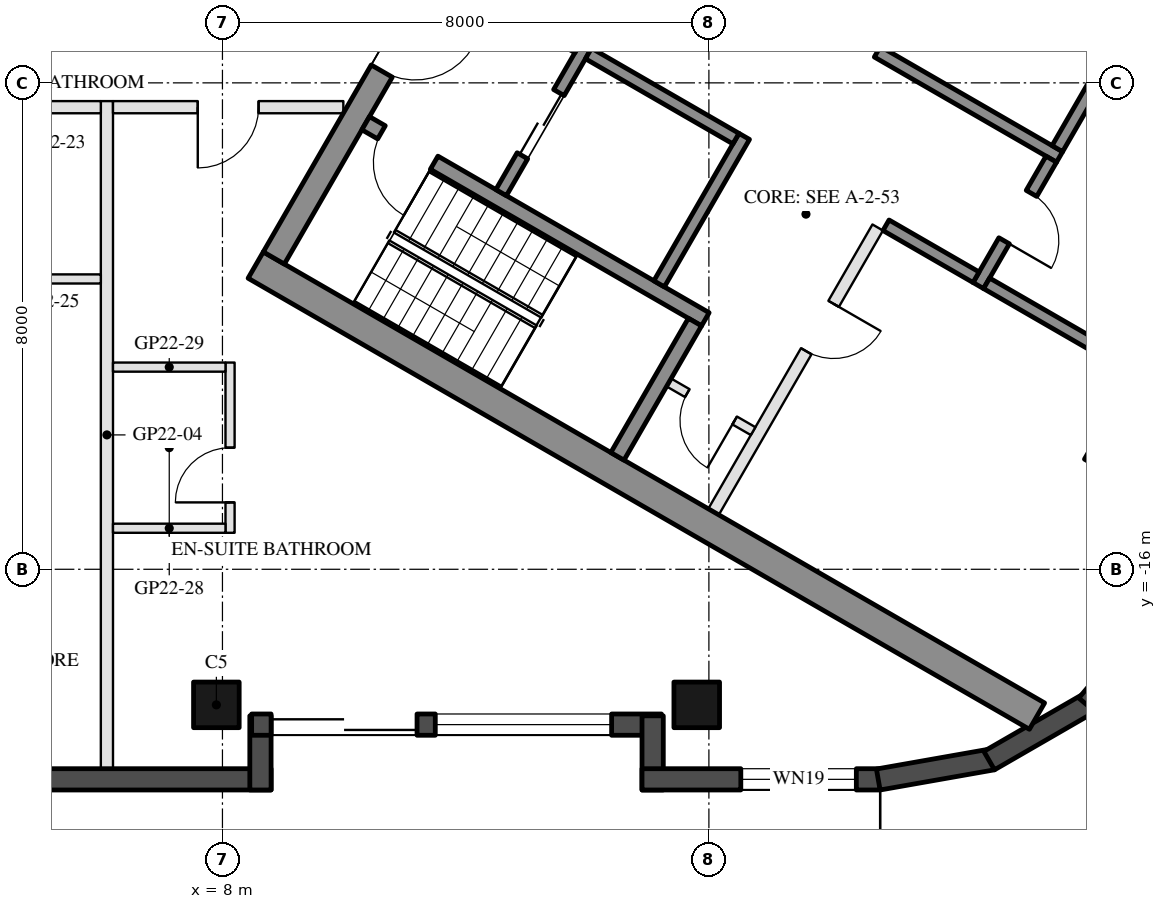
"""IFC4 building model, lengths in metres.
Left out: names, types, materials, properties, quantities, classifications, styles, units other than length and angle.
Written with IfcOpenShell. Run it as: python <this file> out.ifc"""

import sys

from ifc_helpers import new_model, si_unit, direction, frame, frame_2d, origin, origin_2d, place, context, subcontext, project, spatial, rectangle, hollow_rectangle, extrude, element, fill, save


model = new_model("IFC4")
c1 = context("Model", 3, precision=1e-05, world=origin(), true_north=direction((0.0, 1.0)))
c2 = subcontext(c1, "Body", "Model", "MODEL_VIEW")
j1 = project(units=[si_unit("LENGTHUNIT", "METRE"), si_unit("PLANEANGLEUNIT", "RADIAN")], contexts=[c1])
p1 = place(None, origin())
s1 = spatial("IfcSite", under=j1, at=p1, CompositionType="ELEMENT")
p2 = place(p1, origin())
s2 = spatial("IfcBuilding", under=s1, at=p2, CompositionType="ELEMENT")
p3 = place(p2, frame((0.0, 0.0, 228.0)))
s3 = spatial("IfcBuildingStorey", under=s2, at=p3, CompositionType="ELEMENT", Elevation=228.0)
for number, where, z_axis, x_axis in (
    (1, (7.9, -18.23, 0.0), (0.0, 0.0, 1.0), (-1.0, 0.0, 0.0)),
    (2, (15.8, -18.23, 0.0), (0.0, 0.0, 1.0), (-1.0, 0.0, 0.0)),
):
    element("IfcColumn", number, at=place(p3, frame(where, z_axis=z_axis, x_axis=x_axis)), inside=s3, PredefinedType="COLUMN", context=c2, shape_type="SweptSolid", body=[
        extrude(hollow_rectangle(XDim=0.75, YDim=0.75, WallThickness=0.035, at=origin_2d()), origin(), (0.0, 0.0, 1.0), 3.7),
    ])
p4 = place(p3, frame((23.729, -13.7, 0.0), z_axis=(0.0, 0.0, 1.0), x_axis=(0.5, 0.866025403784, 0.0)))
e3 = element("IfcColumn", 3, at=p4, inside=s3, PredefinedType="COLUMN", context=c2, shape_type="SweptSolid", body=[
    extrude(hollow_rectangle(XDim=2.4, YDim=2.2, WallThickness=0.06, at=origin_2d()), origin(), (0.0, 0.0, 1.0), 3.7),
])
p5 = place(p3, frame((-0.9, -19.455, 0.0), z_axis=(0.0, 0.0, 1.0), x_axis=(1.0, 0.0, 0.0)))
e4 = element("IfcWall", 4, at=p5, inside=s3, PredefinedType="SOLIDWALL", context=c2, shape_type="SweptSolid", body=[
    extrude(rectangle(XDim=9.7, YDim=0.35, at=frame_2d((4.85, 0.0))), origin(), (0.0, 0.0, 1.0), 3.45),
])
p6 = place(p5, frame((4.5, 0.0, 0.0)))
e5 = element("IfcOpeningElement", 5, at=p6, cuts=e4, PredefinedType="OPENING", context=c2, shape_type="SweptSolid", body=[
    extrude(rectangle(XDim=1.5, YDim=2.4, at=frame_2d((0.75, 1.2))), frame((0.0, 0.185, 0.0), z_axis=(0.0, -1.0, 0.0), x_axis=(1.0, 0.0, 0.0)), (0.0, 0.0, 1.0), 0.37),
])
p7 = place(p3, frame((8.625, -19.63, 0.0), z_axis=(0.0, 0.0, 1.0), x_axis=(0.0, 1.0, 0.0)))
e6 = element("IfcWall", 6, at=p7, inside=s3, PredefinedType="SOLIDWALL", context=c2, shape_type="SweptSolid", body=[
    extrude(rectangle(XDim=1.22, YDim=0.35, at=frame_2d((0.61, 0.0))), origin(), (0.0, 0.0, 1.0), 3.45),
])
p8 = place(p3, frame((8.48, -18.555, 0.0), z_axis=(0.0, 0.0, 1.0), x_axis=(1.0, 0.0, 0.0)))
e7 = element("IfcWall", 7, at=p8, inside=s3, PredefinedType="SOLIDWALL", context=c2, shape_type="SweptSolid", body=[
    extrude(rectangle(XDim=6.74, YDim=0.35, at=frame_2d((3.37, 0.0))), origin(), (0.0, 0.0, 1.0), 3.45),
])
p9 = place(p8, frame((0.32, 0.0, 0.0)))
e8 = element("IfcOpeningElement", 8, at=p9, cuts=e7, PredefinedType="OPENING", context=c2, shape_type="SweptSolid", body=[
    extrude(rectangle(XDim=2.4, YDim=2.4, at=frame_2d((1.2, 1.2))), frame((0.0, 0.185, 0.0), z_axis=(0.0, -1.0, 0.0), x_axis=(1.0, 0.0, 0.0)), (0.0, 0.0, 1.0), 0.37),
])
p10 = place(p8, frame((3.02, 0.0, 0.3)))
e9 = element("IfcOpeningElement", 9, at=p10, cuts=e7, PredefinedType="OPENING", context=c2, shape_type="SweptSolid", body=[
    extrude(rectangle(XDim=2.9, YDim=2.65, at=frame_2d((1.45, 1.325))), frame((0.0, 0.185, 0.0), z_axis=(0.0, -1.0, 0.0), x_axis=(1.0, 0.0, 0.0)), (0.0, 0.0, 1.0), 0.37),
])
p11 = place(p3, frame((15.075, -18.41, 0.0), z_axis=(0.0, 0.0, 1.0), x_axis=(0.0, -1.0, 0.0)))
e10 = element("IfcWall", 10, at=p11, inside=s3, PredefinedType="SOLIDWALL", context=c2, shape_type="SweptSolid", body=[
    extrude(rectangle(XDim=1.22, YDim=0.35, at=frame_2d((0.61, 0.0))), origin(), (0.0, 0.0, 1.0), 3.45),
])
p12 = place(p3, frame((14.9, -19.455, 0.0), z_axis=(0.0, 0.0, 1.0), x_axis=(1.0, 0.0, 0.0)))
e11 = element("IfcWall", 11, at=p12, inside=s3, PredefinedType="SOLIDWALL", context=c2, shape_type="SweptSolid", body=[
    extrude(rectangle(XDim=3.916, YDim=0.35, at=frame_2d((1.958, 0.0))), origin(), (0.0, 0.0, 1.0), 3.45),
])
p13 = place(p12, frame((1.625, 0.0, 0.3)))
e12 = element("IfcOpeningElement", 12, at=p13, cuts=e11, PredefinedType="OPENING", context=c2, shape_type="SweptSolid", body=[
    extrude(rectangle(XDim=1.9, YDim=2.65, at=frame_2d((0.95, 1.325))), frame((0.0, 0.185, 0.0), z_axis=(0.0, -1.0, 0.0), x_axis=(1.0, 0.0, 0.0)), (0.0, 0.0, 1.0), 0.37),
])
p14 = place(p3, frame((18.785, -19.458, 0.0), z_axis=(0.0, 0.0, 1.0), x_axis=(0.984798995425, 0.173697837091, 0.0)))
e13 = element("IfcWall", 13, at=p14, inside=s3, PredefinedType="SOLIDWALL", context=c2, shape_type="SweptSolid", body=[
    extrude(rectangle(XDim=1.91, YDim=0.35, at=frame_2d((0.955, 0.0))), origin(), (0.0, 0.0, 1.0), 3.45),
])
for number, where, z_axis, x_axis in (
    (14, (20.61, -19.147, 0.0), (0.0, 0.0, 1.0), (0.866, 0.5, 0.0)),
    (15, (22.217, -18.231, 0.0), (0.0, 0.0, 1.0), (0.643, 0.766, 0.0)),
):
    element("IfcWall", number, at=place(p3, frame(where, z_axis=z_axis, x_axis=x_axis)), inside=s3, PredefinedType="SOLIDWALL", context=c2, shape_type="SweptSolid", body=[
        extrude(rectangle(XDim=1.91, YDim=0.35, at=frame_2d((0.955, 0.0))), origin(), (0.0, 0.0, 1.0), 3.45),
    ])
for number, where, z_axis, x_axis in (
    (16, (8.547, -10.997, 0.0), (0.0, 0.0, 1.0), (0.866, -0.5, 0.0)),
    (17, (13.797, -1.903, 0.0), (0.0, 0.0, 1.0), (0.866, -0.5, 0.0)),
):
    element("IfcWall", number, at=place(p3, frame(where, z_axis=z_axis, x_axis=x_axis)), inside=s3, PredefinedType="SHEAR", context=c2, shape_type="SweptSolid", body=[
        extrude(rectangle(XDim=14.837, YDim=0.5, at=frame_2d((7.418, 0.0))), origin(), (0.0, 0.0, 1.0), 3.45),
    ])
p15 = place(p3, frame((8.845, -10.88, 0.0), z_axis=(0.0, 0.0, 1.0), x_axis=(0.500004234368, 0.866022959057, 0.0)))
e18 = element("IfcWall", 18, at=p15, inside=s3, PredefinedType="SHEAR", context=c2, shape_type="SweptSolid", body=[
    extrude(rectangle(XDim=10.0, YDim=0.4, at=frame_2d((5.0, 0.0))), origin(), (0.0, 0.0, 1.0), 3.45),
])
p16 = place(p15, frame((3.55, 0.0, 0.0)))
e19 = element("IfcOpeningElement", 19, at=p16, cuts=e18, PredefinedType="OPENING", context=c2, shape_type="SweptSolid", body=[
    extrude(rectangle(XDim=1.1, YDim=2.1, at=frame_2d((0.55, 1.05))), frame((0.0, 0.21, 0.0), z_axis=(0.0, -1.0, 0.0), x_axis=(1.0, 0.0, 0.0)), (0.0, 0.0, 1.0), 0.42),
])
p17 = place(p15, frame((5.85, 0.0, 0.0)))
e20 = element("IfcOpeningElement", 20, at=p17, cuts=e18, PredefinedType="OPENING", context=c2, shape_type="SweptSolid", body=[
    extrude(rectangle(XDim=1.4, YDim=2.1, at=frame_2d((0.7, 1.05))), frame((0.0, 0.21, 0.0), z_axis=(0.0, -1.0, 0.0), x_axis=(1.0, 0.0, 0.0)), (0.0, 0.0, 1.0), 0.42),
])
p18 = place(p3, frame((10.356, -8.664, 0.0), z_axis=(0.0, 0.0, 1.0), x_axis=(0.866028629588, -0.499994412703, 0.0)))
e21 = element("IfcWall", 21, at=p18, inside=s3, PredefinedType="SHEAR", context=c2, shape_type="SweptSolid", body=[
    extrude(rectangle(XDim=6.45, YDim=0.25, at=frame_2d((3.225, 0.0))), origin(), (0.0, 0.0, 1.0), 3.45),
])
p19 = place(p18, frame((0.3, 0.0, 0.0)))
e22 = element("IfcOpeningElement", 22, at=p19, cuts=e21, PredefinedType="OPENING", context=c2, shape_type="SweptSolid", body=[
    extrude(rectangle(XDim=1.0, YDim=2.1, at=frame_2d((0.5, 1.05))), frame((0.0, 0.135, 0.0), z_axis=(0.0, -1.0, 0.0), x_axis=(1.0, 0.0, 0.0)), (0.0, 0.0, 1.0), 0.27),
])
p20 = place(p3, frame((14.496, -14.143, 0.0), z_axis=(0.0, 0.0, 1.0), x_axis=(0.500062241894, 0.865989465428, 0.0)))
e23 = element("IfcWall", 23, at=p20, inside=s3, PredefinedType="SHEAR", context=c2, shape_type="SweptSolid", body=[
    extrude(rectangle(XDim=2.55, YDim=0.25, at=frame_2d((1.275, 0.0))), origin(), (0.0, 0.0, 1.0), 3.45),
])
p21 = place(p3, frame((15.181, -11.305, 0.0), z_axis=(0.0, 0.0, 1.0), x_axis=(0.49994636267, 0.866056369097, 0.0)))
e24 = element("IfcWall", 24, at=p21, inside=s3, PredefinedType="SHEAR", context=c2, shape_type="SweptSolid", body=[
    extrude(rectangle(XDim=2.8, YDim=0.2, at=frame_2d((1.4, 0.0))), origin(), (0.0, 0.0, 1.0), 3.45),
])
p22 = place(p3, frame((12.583, -9.805, 0.0), z_axis=(0.0, 0.0, 1.0), x_axis=(0.49994636267, 0.866056369097, 0.0)))
e25 = element("IfcWall", 25, at=p22, inside=s3, PredefinedType="SHEAR", context=c2, shape_type="SweptSolid", body=[
    extrude(rectangle(XDim=2.8, YDim=0.2, at=frame_2d((1.4, 0.0))), origin(), (0.0, 0.0, 1.0), 3.45),
])
p23 = place(p22, frame((0.7, 0.0, 0.0)))
e26 = element("IfcOpeningElement", 26, at=p23, cuts=e25, PredefinedType="OPENING", context=c2, shape_type="SweptSolid", body=[
    extrude(rectangle(XDim=1.2, YDim=2.1, at=frame_2d((0.6, 1.05))), frame((0.0, 0.11, 0.0), z_axis=(0.0, -1.0, 0.0), x_axis=(1.0, 0.0, 0.0)), (0.0, 0.0, 1.0), 0.22),
])
p24 = place(p3, frame((11.768, -6.217, 0.0), z_axis=(0.0, 0.0, 1.0), x_axis=(0.866050077142, -0.499957262057, 0.0)))
e27 = element("IfcWall", 27, at=p24, inside=s3, PredefinedType="SHEAR", context=c2, shape_type="SweptSolid", body=[
    extrude(rectangle(XDim=2.4, YDim=0.2, at=frame_2d((1.2, 0.0))), origin(), (0.0, 0.0, 1.0), 3.45),
])
p25 = place(p3, frame((14.02, -7.517, 0.0), z_axis=(0.0, 0.0, 1.0), x_axis=(0.866034573852, -0.49998411664, 0.0)))
e28 = element("IfcWall", 28, at=p25, inside=s3, PredefinedType="SHEAR", context=c2, shape_type="SweptSolid", body=[
    extrude(rectangle(XDim=2.8, YDim=0.2, at=frame_2d((1.4, 0.0))), origin(), (0.0, 0.0, 1.0), 3.45),
])
p26 = place(p3, frame((12.968, -4.138, 0.0), z_axis=(0.0, 0.0, 1.0), x_axis=(0.866028328073, -0.49999493495, 0.0)))
e29 = element("IfcWall", 29, at=p26, inside=s3, PredefinedType="SHEAR", context=c2, shape_type="SweptSolid", body=[
    extrude(rectangle(XDim=10.16, YDim=0.2, at=frame_2d((5.08, 0.0))), origin(), (0.0, 0.0, 1.0), 3.45),
])
p27 = place(p26, frame((5.8, 0.0, 0.0)))
e30 = element("IfcOpeningElement", 30, at=p27, cuts=e29, PredefinedType="OPENING", context=c2, shape_type="SweptSolid", body=[
    extrude(rectangle(XDim=0.9, YDim=2.1, at=frame_2d((0.45, 1.05))), frame((0.0, 0.11, 0.0), z_axis=(0.0, -1.0, 0.0), x_axis=(1.0, 0.0, 0.0)), (0.0, 0.0, 1.0), 0.22),
])
p28 = place(p3, frame((20.43, -11.333, 0.0), z_axis=(0.0, 0.0, 1.0), x_axis=(0.500001309137, 0.866024647952, 0.0)))
e31 = element("IfcWall", 31, at=p28, inside=s3, PredefinedType="SHEAR", context=c2, shape_type="SweptSolid", body=[
    extrude(rectangle(XDim=2.4, YDim=0.2, at=frame_2d((1.2, 0.0))), origin(), (0.0, 0.0, 1.0), 3.45),
])
p29 = place(p28, frame((0.85, 0.0, 0.0)))
e32 = element("IfcOpeningElement", 32, at=p29, cuts=e31, PredefinedType="OPENING", context=c2, shape_type="SweptSolid", body=[
    extrude(rectangle(XDim=0.9, YDim=2.1, at=frame_2d((0.45, 1.05))), frame((0.0, 0.11, 0.0), z_axis=(0.0, -1.0, 0.0), x_axis=(1.0, 0.0, 0.0)), (0.0, 0.0, 1.0), 0.22),
])
p30 = place(p3, frame((18.913, -10.342, 0.0), z_axis=(0.0, 0.0, 1.0), x_axis=(0.866038183914, -0.499977863513, 0.0)))
e33 = element("IfcWall", 33, at=p30, inside=s3, PredefinedType="SHEAR", context=c2, shape_type="SweptSolid", body=[
    extrude(rectangle(XDim=1.71, YDim=0.2, at=frame_2d((0.855, 0.0))), origin(), (0.0, 0.0, 1.0), 3.45),
])
p31 = place(p3, frame((21.73, -9.082, 0.0), z_axis=(0.0, 0.0, 1.0), x_axis=(0.50002537861, 0.866010750942, 0.0)))
e34 = element("IfcWall", 34, at=p31, inside=s3, PredefinedType="SHEAR", context=c2, shape_type="SweptSolid", body=[
    extrude(rectangle(XDim=2.0, YDim=0.2, at=frame_2d((1.0, 0.0))), origin(), (0.0, 0.0, 1.0), 3.45),
])
p32 = place(p3, frame((20.567, -11.297, 0.0), z_axis=(0.0, 0.0, 1.0), x_axis=(0.866055327414, -0.49994816717, 0.0)))
e35 = element("IfcWall", 35, at=p32, inside=s3, PredefinedType="SHEAR", context=c2, shape_type="SweptSolid", body=[
    extrude(rectangle(XDim=2.84, YDim=0.2, at=frame_2d((1.42, 0.0))), origin(), (0.0, 0.0, 1.0), 3.45),
])
p33 = place(p3, frame((16.076, -15.055, 0.0), z_axis=(0.0, 0.0, 1.0), x_axis=(0.499995103361, 0.866028230842, 0.0)))
e36 = element("IfcWall", 36, at=p33, inside=s3, PredefinedType="PARTITIONING", context=c2, shape_type="SweptSolid", body=[
    extrude(rectangle(XDim=5.4, YDim=0.2, at=frame_2d((2.7, 0.0))), origin(), (0.0, 0.0, 1.0), 3.45),
])
p34 = place(p33, frame((3.05, 0.0, 0.0)))
e37 = element("IfcOpeningElement", 37, at=p34, cuts=e36, PredefinedType="OPENING", context=c2, shape_type="SweptSolid", body=[
    extrude(rectangle(XDim=0.9, YDim=2.1, at=frame_2d((0.45, 1.05))), frame((0.0, 0.11, 0.0), z_axis=(0.0, -1.0, 0.0), x_axis=(1.0, 0.0, 0.0)), (0.0, 0.0, 1.0), 0.22),
])
p35 = place(p3, frame((15.342, -12.928, 0.0), z_axis=(0.0, 0.0, 1.0), x_axis=(0.865989903783, -0.500061482766, 0.0)))
e38 = element("IfcWall", 38, at=p35, inside=s3, PredefinedType="PARTITIONING", context=c2, shape_type="SweptSolid", body=[
    extrude(rectangle(XDim=1.6, YDim=0.15, at=frame_2d((0.8, 0.0))), origin(), (0.0, 0.0, 1.0), 3.45),
])
p36 = place(p35, frame((0.35, 0.0, 0.0)))
e39 = element("IfcOpeningElement", 39, at=p36, cuts=e38, PredefinedType="OPENING", context=c2, shape_type="SweptSolid", body=[
    extrude(rectangle(XDim=0.9, YDim=2.1, at=frame_2d((0.45, 1.05))), frame((0.0, 0.085, 0.0), z_axis=(0.0, -1.0, 0.0), x_axis=(1.0, 0.0, 0.0)), (0.0, 0.0, 1.0), 0.17),
])
p37 = place(p3, frame((6.1, -19.28, 0.0), z_axis=(0.0, 0.0, 1.0), x_axis=(0.0, 1.0, 0.0)))
e40 = element("IfcWall", 40, at=p37, inside=s3, PredefinedType="PARTITIONING", context=c2, shape_type="SweptSolid", body=[
    extrude(rectangle(XDim=10.98, YDim=0.2, at=frame_2d((5.49, 0.0))), origin(), (0.0, 0.0, 1.0), 2.96),
])
p38 = place(p3, frame((6.0, -8.4, 0.0), z_axis=(0.0, 0.0, 1.0), x_axis=(-1.0, 0.0, 0.0)))
e41 = element("IfcWall", 41, at=p38, inside=s3, PredefinedType="PARTITIONING", context=c2, shape_type="SweptSolid", body=[
    extrude(rectangle(XDim=3.906, YDim=0.2, at=frame_2d((1.953, 0.0))), origin(), (0.0, 0.0, 1.0), 2.76),
])
p39 = place(p38, frame((2.45, 0.0, 0.0)))
e42 = element("IfcOpeningElement", 42, at=p39, cuts=e41, PredefinedType="OPENING", context=c2, shape_type="SweptSolid", body=[
    extrude(rectangle(XDim=1.0, YDim=2.1, at=frame_2d((0.5, 1.05))), frame((0.0, 0.11, 0.0), z_axis=(0.0, -1.0, 0.0), x_axis=(1.0, 0.0, 0.0)), (0.0, 0.0, 1.0), 0.22),
])
p40 = place(p3, frame((4.15, -11.225, 0.0), z_axis=(0.0, 0.0, 1.0), x_axis=(1.0, 0.0, 0.0)))
e43 = element("IfcWall", 43, at=p40, inside=s3, PredefinedType="PARTITIONING", context=c2, shape_type="SweptSolid", body=[
    extrude(rectangle(XDim=1.85, YDim=0.15, at=frame_2d((0.925, 0.0))), origin(), (0.0, 0.0, 1.0), 3.45),
])
p41 = place(p3, frame((9.988, -8.4, 0.0), z_axis=(0.0, 0.0, 1.0), x_axis=(-1.0, 0.0, 0.0)))
e44 = element("IfcWall", 44, at=p41, inside=s3, PredefinedType="PARTITIONING", context=c2, shape_type="SweptSolid", body=[
    extrude(rectangle(XDim=3.788, YDim=0.2, at=frame_2d((1.894, 0.0))), origin(), (0.0, 0.0, 1.0), 2.76),
])
p42 = place(p41, frame((1.394, 0.0, 0.0)))
e45 = element("IfcOpeningElement", 45, at=p42, cuts=e44, PredefinedType="OPENING", context=c2, shape_type="SweptSolid", body=[
    extrude(rectangle(XDim=1.0, YDim=2.1, at=frame_2d((0.5, 1.05))), frame((0.0, 0.11, 0.0), z_axis=(0.0, -1.0, 0.0), x_axis=(1.0, 0.0, 0.0)), (0.0, 0.0, 1.0), 0.22),
])
p43 = place(p3, frame((8.125, -15.4, 0.0), z_axis=(0.0, 0.0, 1.0), x_axis=(0.0, 1.0, 0.0)))
e46 = element("IfcWall", 46, at=p43, inside=s3, PredefinedType="PARTITIONING", context=c2, shape_type="SweptSolid", body=[
    extrude(rectangle(XDim=2.8, YDim=0.15, at=frame_2d((1.4, 0.0))), origin(), (0.0, 0.0, 1.0), 3.45),
])
p44 = place(p43, frame((0.5, 0.0, 0.0)))
e47 = element("IfcOpeningElement", 47, at=p44, cuts=e46, PredefinedType="OPENING", context=c2, shape_type="SweptSolid", body=[
    extrude(rectangle(XDim=0.9, YDim=2.1, at=frame_2d((0.45, 1.05))), frame((0.0, 0.085, 0.0), z_axis=(0.0, -1.0, 0.0), x_axis=(1.0, 0.0, 0.0)), (0.0, 0.0, 1.0), 0.17),
])
for number, where, z_axis, x_axis in (
    (48, (6.2, -15.325, 0.0), (0.0, 0.0, 1.0), (1.0, 0.0, 0.0)),
    (49, (6.2, -12.675, 0.0), (0.0, 0.0, 1.0), (1.0, 0.0, 0.0)),
):
    element("IfcWall", number, at=place(p3, frame(where, z_axis=z_axis, x_axis=x_axis)), inside=s3, PredefinedType="PARTITIONING", context=c2, shape_type="SweptSolid", body=[
        extrude(rectangle(XDim=1.85, YDim=0.15, at=frame_2d((0.925, 0.0))), origin(), (0.0, 0.0, 1.0), 2.76),
    ])
p45 = place(p9, frame((2.4, 0.0, 0.0), z_axis=(0.0, 0.0, 1.0), x_axis=(-1.0, 0.0, 0.0)))
e50 = element("IfcDoor", 50, at=p45, inside=s3, OperationType="SLIDING_TO_LEFT", PredefinedType="DOOR", context=c2, shape_type="SweptSolid", body=[
    extrude(rectangle(XDim=2.4, YDim=2.4, at=frame_2d((1.2, 1.2))), frame((0.0, 0.025, 0.0), z_axis=(0.0, -1.0, 0.0), x_axis=(1.0, 0.0, 0.0)), (0.0, 0.0, 1.0), 0.05),
])
fill(e8, e50)
p46 = place(p10, origin())
e51 = element("IfcWindow", 51, at=p46, inside=s3, PartitioningType="SINGLE_PANEL", PredefinedType="WINDOW", context=c2, shape_type="SweptSolid", body=[
    extrude(rectangle(XDim=2.9, YDim=2.65, at=frame_2d((1.45, 1.325))), frame((0.0, 0.03, 0.0), z_axis=(0.0, -1.0, 0.0), x_axis=(1.0, 0.0, 0.0)), (0.0, 0.0, 1.0), 0.06),
])
fill(e9, e51)
p47 = place(p13, origin())
e52 = element("IfcWindow", 52, at=p47, inside=s3, PartitioningType="SINGLE_PANEL", PredefinedType="WINDOW", context=c2, shape_type="SweptSolid", body=[
    extrude(rectangle(XDim=1.9, YDim=2.65, at=frame_2d((0.95, 1.325))), frame((0.0, 0.03, 0.0), z_axis=(0.0, -1.0, 0.0), x_axis=(1.0, 0.0, 0.0)), (0.0, 0.0, 1.0), 0.06),
])
fill(e12, e52)
p48 = place(p23, origin())
e53 = element("IfcDoor", 53, at=p48, inside=s3, OperationType="DOUBLE_DOOR_SLIDING", PredefinedType="DOOR", context=c2, shape_type="SweptSolid", body=[
    extrude(rectangle(XDim=1.2, YDim=2.1, at=frame_2d((0.6, 1.05))), frame((0.0, 0.025, 0.0), z_axis=(0.0, -1.0, 0.0), x_axis=(1.0, 0.0, 0.0)), (0.0, 0.0, 1.0), 0.05),
])
fill(e26, e53)
p49 = place(p36, frame((0.9, 0.0, 0.0), z_axis=(0.0, 0.0, 1.0), x_axis=(-1.0, 0.0, 0.0)))
e54 = element("IfcDoor", 54, at=p49, inside=s3, OperationType="SINGLE_SWING_LEFT", PredefinedType="DOOR", context=c2, shape_type="SweptSolid", body=[
    extrude(rectangle(XDim=0.9, YDim=2.1, at=frame_2d((0.45, 1.05))), frame((0.0, 0.025, 0.0), z_axis=(0.0, -1.0, 0.0), x_axis=(1.0, 0.0, 0.0)), (0.0, 0.0, 1.0), 0.05),
])
fill(e39, e54)
p50 = place(p27, origin())
e55 = element("IfcDoor", 55, at=p50, inside=s3, OperationType="SINGLE_SWING_LEFT", PredefinedType="DOOR", context=c2, shape_type="SweptSolid", body=[
    extrude(rectangle(XDim=0.9, YDim=2.1, at=frame_2d((0.45, 1.05))), frame((0.0, 0.025, 0.0), z_axis=(0.0, -1.0, 0.0), x_axis=(1.0, 0.0, 0.0)), (0.0, 0.0, 1.0), 0.05),
])
fill(e30, e55)
p51 = place(p29, frame((0.9, 0.0, 0.0), z_axis=(0.0, 0.0, 1.0), x_axis=(-1.0, 0.0, 0.0)))
e56 = element("IfcDoor", 56, at=p51, inside=s3, OperationType="SINGLE_SWING_RIGHT", PredefinedType="DOOR", context=c2, shape_type="SweptSolid", body=[
    extrude(rectangle(XDim=0.9, YDim=2.1, at=frame_2d((0.45, 1.05))), frame((0.0, 0.025, 0.0), z_axis=(0.0, -1.0, 0.0), x_axis=(1.0, 0.0, 0.0)), (0.0, 0.0, 1.0), 0.05),
])
fill(e32, e56)
p52 = place(p34, frame((0.9, 0.0, 0.0), z_axis=(0.0, 0.0, 1.0), x_axis=(-1.0, 0.0, 0.0)))
e57 = element("IfcDoor", 57, at=p52, inside=s3, OperationType="SINGLE_SWING_LEFT", PredefinedType="DOOR", context=c2, shape_type="SweptSolid", body=[
    extrude(rectangle(XDim=0.9, YDim=2.1, at=frame_2d((0.45, 1.05))), frame((0.0, 0.025, 0.0), z_axis=(0.0, -1.0, 0.0), x_axis=(1.0, 0.0, 0.0)), (0.0, 0.0, 1.0), 0.05),
])
fill(e37, e57)
p53 = place(p16, frame((1.1, 0.0, 0.0), z_axis=(0.0, 0.0, 1.0), x_axis=(-1.0, 0.0, 0.0)))
e58 = element("IfcDoor", 58, at=p53, inside=s3, OperationType="SINGLE_SWING_LEFT", PredefinedType="DOOR", context=c2, shape_type="SweptSolid", body=[
    extrude(rectangle(XDim=1.1, YDim=2.1, at=frame_2d((0.55, 1.05))), frame((0.0, 0.025, 0.0), z_axis=(0.0, -1.0, 0.0), x_axis=(1.0, 0.0, 0.0)), (0.0, 0.0, 1.0), 0.05),
])
fill(e19, e58)
p54 = place(p19, frame((1.0, 0.0, 0.0), z_axis=(0.0, 0.0, 1.0), x_axis=(-1.0, 0.0, 0.0)))
e59 = element("IfcDoor", 59, at=p54, inside=s3, OperationType="SINGLE_SWING_LEFT", PredefinedType="DOOR", context=c2, shape_type="SweptSolid", body=[
    extrude(rectangle(XDim=1.0, YDim=2.1, at=frame_2d((0.5, 1.05))), frame((0.0, 0.025, 0.0), z_axis=(0.0, -1.0, 0.0), x_axis=(1.0, 0.0, 0.0)), (0.0, 0.0, 1.0), 0.05),
])
fill(e22, e59)
p55 = place(p44, origin())
e60 = element("IfcDoor", 60, at=p55, inside=s3, OperationType="SINGLE_SWING_LEFT", PredefinedType="DOOR", context=c2, shape_type="SweptSolid", body=[
    extrude(rectangle(XDim=0.9, YDim=2.1, at=frame_2d((0.45, 1.05))), frame((0.0, 0.025, 0.0), z_axis=(0.0, -1.0, 0.0), x_axis=(1.0, 0.0, 0.0)), (0.0, 0.0, 1.0), 0.05),
])
fill(e47, e60)
p56 = place(p42, origin())
e61 = element("IfcDoor", 61, at=p56, inside=s3, OperationType="SINGLE_SWING_RIGHT", PredefinedType="DOOR", context=c2, shape_type="SweptSolid", body=[
    extrude(rectangle(XDim=1.0, YDim=2.1, at=frame_2d((0.5, 1.05))), frame((0.0, 0.025, 0.0), z_axis=(0.0, -1.0, 0.0), x_axis=(1.0, 0.0, 0.0)), (0.0, 0.0, 1.0), 0.05),
])
fill(e45, e61)
save(model, sys.argv[1])
